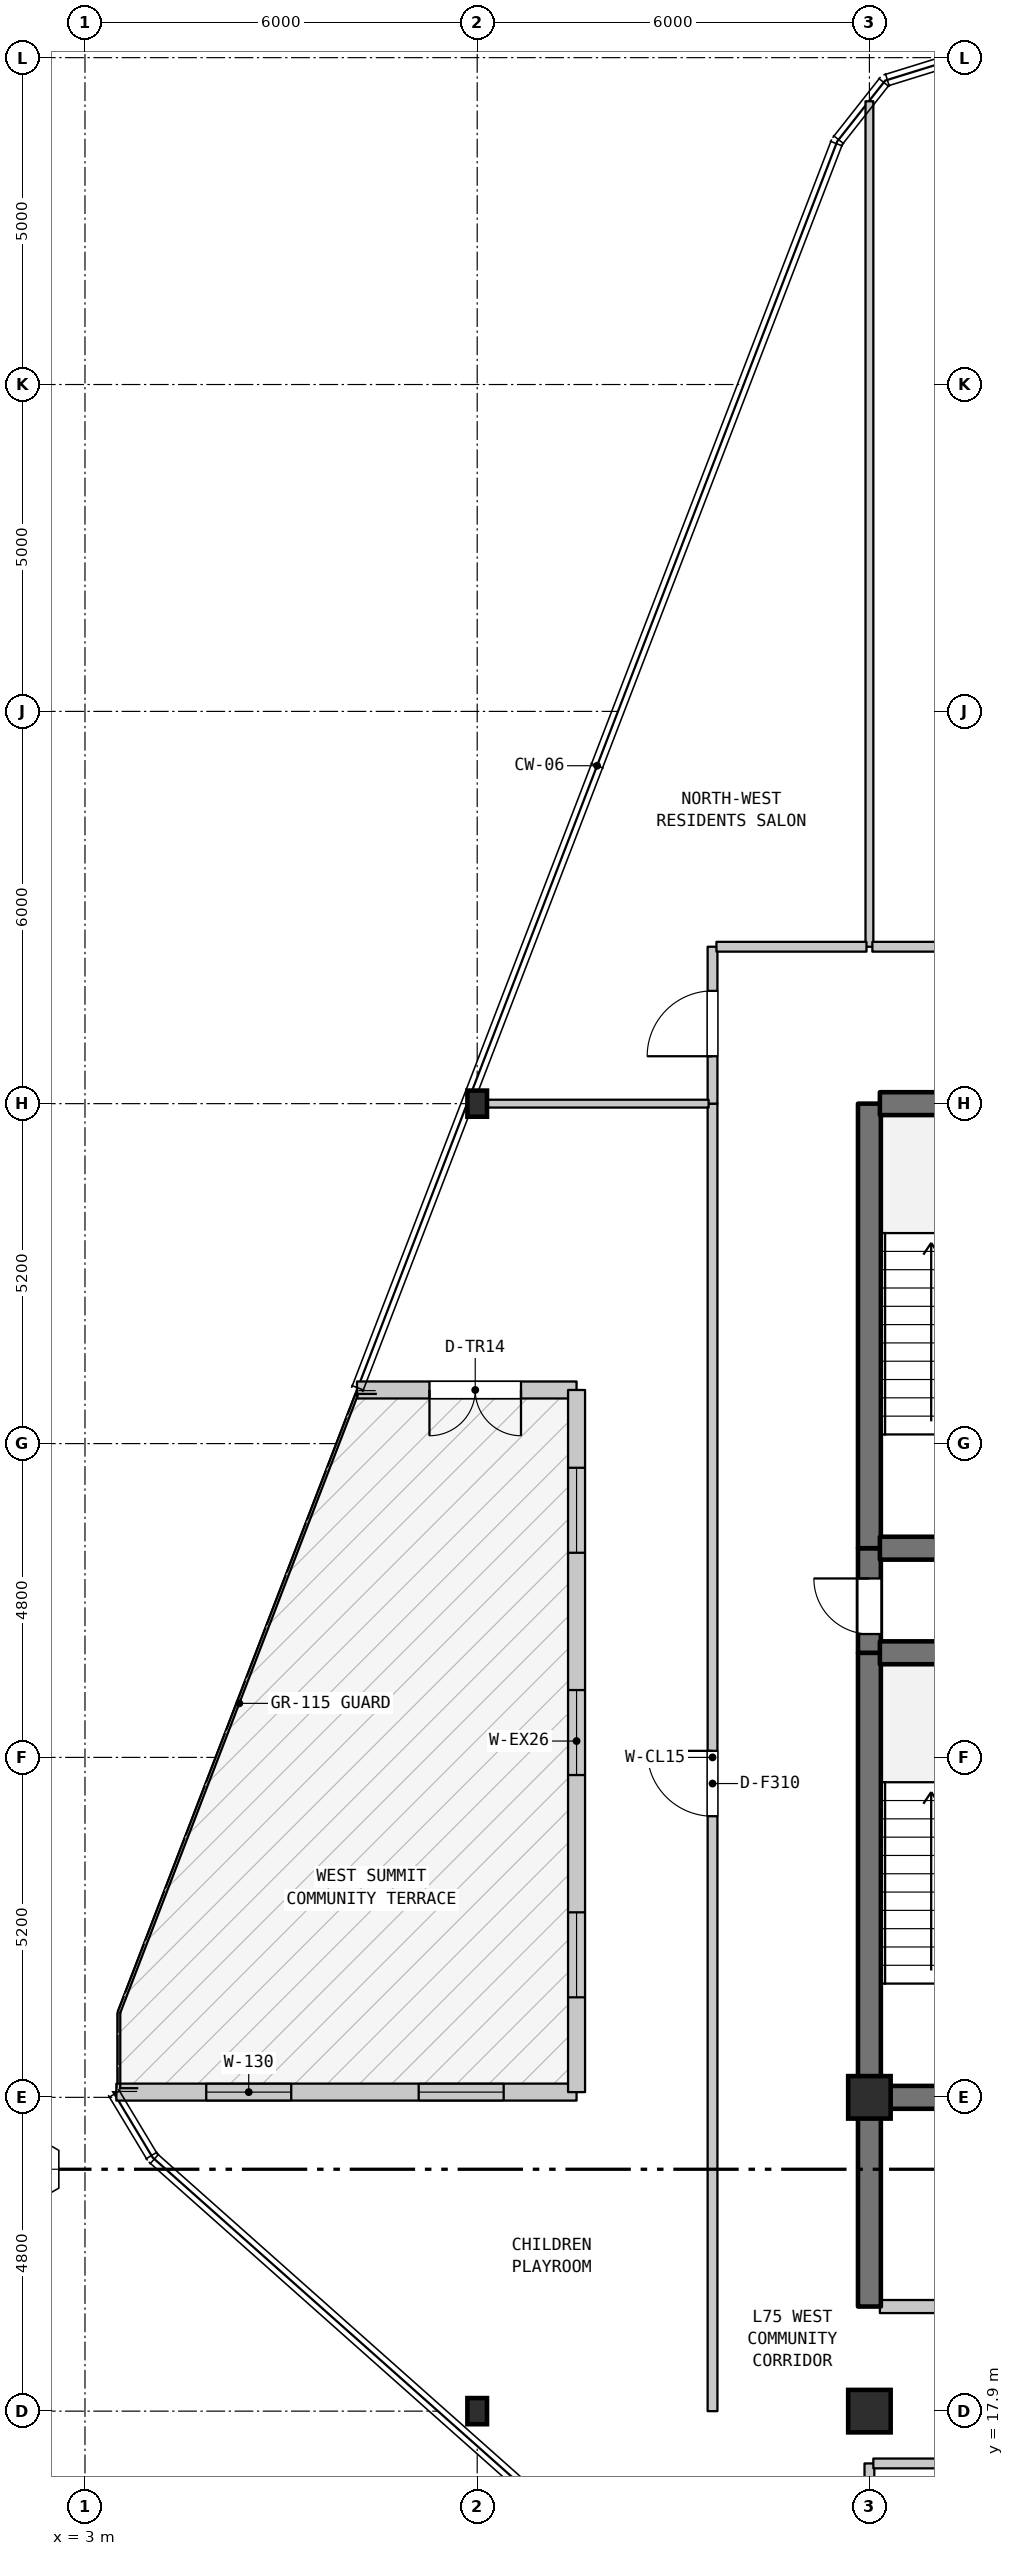
"""IFC4 building model, lengths in metres.
Left out: names, types, materials, properties, quantities, classifications, styles, units other than length and angle.
Written with IfcOpenShell. Run it as: python <this file> out.ifc"""

import sys

from ifc_helpers import new_model, si_unit, direction, frame, frame_2d, origin, origin_2d, place, context, subcontext, project, spatial, rectangle, i_section, extrude, element, fill, save


model = new_model("IFC4")
c1 = context("Model", 3, precision=1e-05, world=origin(), true_north=direction((0.0, 1.0)))
c2 = subcontext(c1, "Body", "Model", "MODEL_VIEW")
j1 = project(units=[si_unit("LENGTHUNIT", "METRE"), si_unit("PLANEANGLEUNIT", "RADIAN")], contexts=[c1])
p1 = place(None, origin())
s1 = spatial("IfcSite", under=j1, at=p1, CompositionType="ELEMENT")
p2 = place(p1, origin())
s2 = spatial("IfcBuilding", under=s1, at=p2, CompositionType="ELEMENT")
p3 = place(p2, frame((0.0, 0.0, 299.1)))
s3 = spatial("IfcBuildingStorey", under=s2, at=p3, CompositionType="ELEMENT", Elevation=299.1)
for number, where, z_axis, x_axis in (
    (1, (9.0, 17.9, 0.0), (0.0, 0.0, 1.0), (1.0, 0.0, 0.0)),
    (2, (9.0, 37.9, 0.0), (0.0, 0.0, 1.0), (1.0, 0.0, 0.0)),
):
    element("IfcColumn", number, at=place(p3, frame(where, z_axis=z_axis, x_axis=x_axis)), inside=s3, PredefinedType="COLUMN", context=c2, shape_type="SweptSolid", body=[
        extrude(i_section(OverallWidth=0.3, OverallDepth=0.4, WebThickness=0.013, FlangeThickness=0.024, FilletRadius=0.027, at=origin_2d()), origin(), (0.0, 0.0, 1.0), 4.5),
    ])
for number, where, z_axis, x_axis in (
    (3, (15.0, 17.9, 0.0), (0.0, 0.0, 1.0), (1.0, 0.0, 0.0)),
    (4, (15.0, 22.7, 0.0), (0.0, 0.0, 1.0), (1.0, 0.0, 0.0)),
):
    element("IfcColumn", number, at=place(p3, frame(where, z_axis=z_axis, x_axis=x_axis)), inside=s3, PredefinedType="COLUMN", context=c2, shape_type="SweptSolid", body=[
        extrude(rectangle(XDim=0.65, YDim=0.65, at=origin_2d()), origin(), (0.0, 0.0, 1.0), 4.5),
    ])
p4 = place(p3, frame((10.52, 33.52, 0.0), z_axis=(0.0, 0.0, 1.0), x_axis=(-1.0, 0.0, 0.0)))
e5 = element("IfcWall", 5, at=p4, inside=s3, PredefinedType="STANDARD", context=c2, shape_type="SweptSolid", body=[
    extrude(rectangle(XDim=3.359, YDim=0.26, at=frame_2d((1.68, 0.0))), origin(), (0.0, 0.0, 1.0), 4.19),
])
p5 = place(p4, frame((0.85, 0.0, 0.0)))
e6 = element("IfcOpeningElement", 6, at=p5, cuts=e5, PredefinedType="OPENING", context=c2, shape_type="SweptSolid", body=[
    extrude(rectangle(XDim=1.4, YDim=2.2, at=frame_2d((0.7, 1.1))), frame((0.0, 0.14, 0.0), z_axis=(0.0, -1.0, 0.0), x_axis=(1.0, 0.0, 0.0)), (0.0, 0.0, 1.0), 0.28),
])
p6 = place(p3, frame((3.48, 22.78, 0.0), z_axis=(0.0, 0.0, 1.0), x_axis=(1.0, 0.0, 0.0)))
e7 = element("IfcWall", 7, at=p6, inside=s3, PredefinedType="STANDARD", context=c2, shape_type="SweptSolid", body=[
    extrude(rectangle(XDim=7.04, YDim=0.26, at=frame_2d((3.52, 0.0))), origin(), (0.0, 0.0, 1.0), 4.19),
])
p7 = place(p6, frame((1.375, 0.0, 0.85)))
e8 = element("IfcOpeningElement", 8, at=p7, cuts=e7, PredefinedType="OPENING", context=c2, shape_type="SweptSolid", body=[
    extrude(rectangle(XDim=1.3, YDim=1.9, at=frame_2d((0.65, 0.95))), frame((0.0, 0.14, 0.0), z_axis=(0.0, -1.0, 0.0), x_axis=(1.0, 0.0, 0.0)), (0.0, 0.0, 1.0), 0.28),
])
p8 = place(p6, frame((4.625, 0.0, 0.85)))
e9 = element("IfcOpeningElement", 9, at=p8, cuts=e7, PredefinedType="OPENING", context=c2, shape_type="SweptSolid", body=[
    extrude(rectangle(XDim=1.3, YDim=1.9, at=frame_2d((0.65, 0.95))), frame((0.0, 0.14, 0.0), z_axis=(0.0, -1.0, 0.0), x_axis=(1.0, 0.0, 0.0)), (0.0, 0.0, 1.0), 0.28),
])
p9 = place(p3, frame((10.52, 22.78, 0.0), z_axis=(0.0, 0.0, 1.0), x_axis=(0.0, 1.0, 0.0)))
e10 = element("IfcWall", 10, at=p9, inside=s3, PredefinedType="STANDARD", context=c2, shape_type="SweptSolid", body=[
    extrude(rectangle(XDim=10.74, YDim=0.26, at=frame_2d((5.37, 0.0))), origin(), (0.0, 0.0, 1.0), 4.19),
])
p10 = place(p9, frame((1.45, 0.0, 0.85)))
e11 = element("IfcOpeningElement", 11, at=p10, cuts=e10, PredefinedType="OPENING", context=c2, shape_type="SweptSolid", body=[
    extrude(rectangle(XDim=1.3, YDim=1.9, at=frame_2d((0.65, 0.95))), frame((0.0, 0.14, 0.0), z_axis=(0.0, -1.0, 0.0), x_axis=(1.0, 0.0, 0.0)), (0.0, 0.0, 1.0), 0.28),
])
p11 = place(p9, frame((4.85, 0.0, 0.85)))
e12 = element("IfcOpeningElement", 12, at=p11, cuts=e10, PredefinedType="OPENING", context=c2, shape_type="SweptSolid", body=[
    extrude(rectangle(XDim=1.3, YDim=1.9, at=frame_2d((0.65, 0.95))), frame((0.0, 0.14, 0.0), z_axis=(0.0, -1.0, 0.0), x_axis=(1.0, 0.0, 0.0)), (0.0, 0.0, 1.0), 0.28),
])
p12 = place(p9, frame((8.25, 0.0, 0.85)))
e13 = element("IfcOpeningElement", 13, at=p12, cuts=e10, PredefinedType="OPENING", context=c2, shape_type="SweptSolid", body=[
    extrude(rectangle(XDim=1.3, YDim=1.9, at=frame_2d((0.65, 0.95))), frame((0.0, 0.14, 0.0), z_axis=(0.0, -1.0, 0.0), x_axis=(1.0, 0.0, 0.0)), (0.0, 0.0, 1.0), 0.28),
])
p13 = place(p3, frame((12.6, 17.9, 0.0), z_axis=(0.0, 0.0, 1.0), x_axis=(0.0, 1.0, 0.0)))
e14 = element("IfcWall", 14, at=p13, inside=s3, PredefinedType="STANDARD", context=c2, shape_type="SweptSolid", body=[
    extrude(rectangle(XDim=20.0, YDim=0.15, at=frame_2d((10.0, 0.0))), origin(), (0.0, 0.0, 1.0), 4.19),
])
p14 = place(p13, frame((9.1, 0.0, 0.0)))
e15 = element("IfcOpeningElement", 15, at=p14, cuts=e14, PredefinedType="OPENING", context=c2, shape_type="SweptSolid", body=[
    extrude(rectangle(XDim=1.0, YDim=2.15, at=frame_2d((0.5, 1.075))), frame((0.0, 0.085, 0.0), z_axis=(0.0, -1.0, 0.0), x_axis=(1.0, 0.0, 0.0)), (0.0, 0.0, 1.0), 0.17),
])
p15 = place(p3, frame((12.6, 37.9, 0.0), z_axis=(0.0, 0.0, 1.0), x_axis=(0.0, 1.0, 0.0)))
e16 = element("IfcWall", 16, at=p15, inside=s3, PredefinedType="STANDARD", context=c2, shape_type="SweptSolid", body=[
    extrude(rectangle(XDim=2.4, YDim=0.15, at=frame_2d((1.2, 0.0))), origin(), (0.0, 0.0, 1.0), 4.19),
])
p16 = place(p15, frame((0.725, 0.0, 0.0)))
e17 = element("IfcOpeningElement", 17, at=p16, cuts=e16, PredefinedType="OPENING", context=c2, shape_type="SweptSolid", body=[
    extrude(rectangle(XDim=1.0, YDim=2.15, at=frame_2d((0.5, 1.075))), frame((0.0, 0.085, 0.0), z_axis=(0.0, -1.0, 0.0), x_axis=(1.0, 0.0, 0.0)), (0.0, 0.0, 1.0), 0.17),
])
p17 = place(p3, frame((15.0, 13.0, 0.0), z_axis=(0.0, 0.0, 1.0), x_axis=(0.0, 1.0, 0.0)))
e18 = element("IfcWall", 18, at=p17, inside=s3, PredefinedType="STANDARD", context=c2, shape_type="SweptSolid", body=[
    extrude(rectangle(XDim=4.1, YDim=0.15, at=frame_2d((2.05, 0.0))), origin(), (0.0, 0.0, 1.0), 3.9),
])
p18 = place(p3, frame((15.0, 19.5, 0.0), z_axis=(0.0, 0.0, 1.0), x_axis=(0.0, 1.0, 0.0)))
e19 = element("IfcWall", 19, at=p18, inside=s3, PredefinedType="SHEAR", context=c2, shape_type="SweptSolid", body=[
    extrude(rectangle(XDim=3.2, YDim=0.35, at=frame_2d((1.6, 0.0))), origin(), (0.0, 0.0, 1.0), 4.19),
])
p19 = place(p3, frame((15.0, 22.7, 0.0), z_axis=(0.0, 0.0, 1.0), x_axis=(0.0, 1.0, 0.0)))
e20 = element("IfcWall", 20, at=p19, inside=s3, PredefinedType="SHEAR", context=c2, shape_type="SweptSolid", body=[
    extrude(rectangle(XDim=6.8, YDim=0.35, at=frame_2d((3.4, 0.0))), origin(), (0.0, 0.0, 1.0), 4.19),
])
p20 = place(p3, frame((15.0, 29.5, 0.0), z_axis=(0.0, 0.0, 1.0), x_axis=(0.0, 1.0, 0.0)))
e21 = element("IfcWall", 21, at=p20, inside=s3, PredefinedType="SHEAR", context=c2, shape_type="SweptSolid", body=[
    extrude(rectangle(XDim=1.6, YDim=0.35, at=frame_2d((0.8, 0.0))), origin(), (0.0, 0.0, 1.0), 4.19),
])
p21 = place(p20, frame((0.287, 0.0, 0.0)))
e22 = element("IfcOpeningElement", 22, at=p21, cuts=e21, PredefinedType="OPENING", context=c2, shape_type="SweptSolid", body=[
    extrude(rectangle(XDim=0.85, YDim=2.1, at=frame_2d((0.425, 1.05))), frame((0.0, 0.185, 0.0), z_axis=(0.0, -1.0, 0.0), x_axis=(1.0, 0.0, 0.0)), (0.0, 0.0, 1.0), 0.37),
])
p22 = place(p3, frame((15.0, 31.1, 0.0), z_axis=(0.0, 0.0, 1.0), x_axis=(0.0, 1.0, 0.0)))
e23 = element("IfcWall", 23, at=p22, inside=s3, PredefinedType="SHEAR", context=c2, shape_type="SweptSolid", body=[
    extrude(rectangle(XDim=6.8, YDim=0.35, at=frame_2d((3.4, 0.0))), origin(), (0.0, 0.0, 1.0), 4.19),
])
p23 = place(p3, frame((15.0, 40.3, 0.0), z_axis=(0.0, 0.0, 1.0), x_axis=(0.0, 1.0, 0.0)))
e24 = element("IfcWall", 24, at=p23, inside=s3, PredefinedType="PARTITIONING", context=c2, shape_type="SweptSolid", body=[
    extrude(rectangle(XDim=12.933, YDim=0.12, at=frame_2d((6.466, 0.0))), origin(), (0.0, 0.0, 1.0), 4.19),
])
p24 = place(p3, frame((15.06, 17.1, 0.0), z_axis=(0.0, 0.0, 1.0), x_axis=(1.0, 0.0, 0.0)))
e25 = element("IfcWall", 25, at=p24, inside=s3, PredefinedType="STANDARD", context=c2, shape_type="SweptSolid", body=[
    extrude(rectangle(XDim=8.295, YDim=0.15, at=frame_2d((4.147, 0.0))), origin(), (0.0, 0.0, 1.0), 4.19),
])
p25 = place(p24, frame((1.595, 0.0, 0.0)))
e26 = element("IfcOpeningElement", 26, at=p25, cuts=e25, PredefinedType="OPENING", context=c2, shape_type="SweptSolid", body=[
    extrude(rectangle(XDim=0.9, YDim=2.1, at=frame_2d((0.45, 1.05))), frame((0.0, 0.085, 0.0), z_axis=(0.0, -1.0, 0.0), x_axis=(1.0, 0.0, 0.0)), (0.0, 0.0, 1.0), 0.17),
])
p26 = place(p24, frame((5.645, 0.0, 0.0)))
e27 = element("IfcOpeningElement", 27, at=p26, cuts=e25, PredefinedType="OPENING", context=c2, shape_type="SweptSolid", body=[
    extrude(rectangle(XDim=0.9, YDim=2.1, at=frame_2d((0.45, 1.05))), frame((0.0, 0.085, 0.0), z_axis=(0.0, -1.0, 0.0), x_axis=(1.0, 0.0, 0.0)), (0.0, 0.0, 1.0), 0.17),
])
p27 = place(p3, frame((15.16, 19.5, 0.0), z_axis=(0.0, 0.0, 1.0), x_axis=(1.0, 0.0, 0.0)))
e28 = element("IfcWall", 28, at=p27, inside=s3, PredefinedType="STANDARD", context=c2, shape_type="SweptSolid", body=[
    extrude(rectangle(XDim=3.68, YDim=0.2, at=frame_2d((1.84, 0.0))), origin(), (0.0, 0.0, 1.0), 4.19),
])
p28 = place(p27, frame((1.39, 0.0, 0.0)))
e29 = element("IfcOpeningElement", 29, at=p28, cuts=e28, PredefinedType="OPENING", context=c2, shape_type="SweptSolid", body=[
    extrude(rectangle(XDim=0.9, YDim=2.15, at=frame_2d((0.45, 1.075))), frame((0.0, 0.11, 0.0), z_axis=(0.0, -1.0, 0.0), x_axis=(1.0, 0.0, 0.0)), (0.0, 0.0, 1.0), 0.22),
])
for number, where, z_axis, x_axis in (
    (30, (15.16, 22.7, 0.0), (0.0, 0.0, 1.0), (1.0, 0.0, 0.0)),
    (31, (15.16, 29.5, 0.0), (0.0, 0.0, 1.0), (1.0, 0.0, 0.0)),
    (32, (15.16, 31.1, 0.0), (0.0, 0.0, 1.0), (1.0, 0.0, 0.0)),
):
    element("IfcWall", number, at=place(p3, frame(where, z_axis=z_axis, x_axis=x_axis)), inside=s3, PredefinedType="SHEAR", context=c2, shape_type="SweptSolid", body=[
        extrude(rectangle(XDim=3.68, YDim=0.35, at=frame_2d((1.84, 0.0))), origin(), (0.0, 0.0, 1.0), 4.19),
    ])
p29 = place(p3, frame((8.856, 37.9, 0.0), z_axis=(0.0, 0.0, 1.0), x_axis=(1.0, 0.0, 0.0)))
e33 = element("IfcWall", 33, at=p29, inside=s3, PredefinedType="PARTITIONING", context=c2, shape_type="SweptSolid", body=[
    extrude(rectangle(XDim=3.684, YDim=0.12, at=frame_2d((1.842, 0.0))), origin(), (0.0, 0.0, 1.0), 3.84),
])
p30 = place(p3, frame((15.16, 37.9, 0.0), z_axis=(0.0, 0.0, 1.0), x_axis=(1.0, 0.0, 0.0)))
e34 = element("IfcWall", 34, at=p30, inside=s3, PredefinedType="SHEAR", context=c2, shape_type="SweptSolid", body=[
    extrude(rectangle(XDim=3.68, YDim=0.35, at=frame_2d((1.84, 0.0))), origin(), (0.0, 0.0, 1.0), 4.19),
])
p31 = place(p3, frame((12.66, 40.3, 0.0), z_axis=(0.0, 0.0, 1.0), x_axis=(1.0, 0.0, 0.0)))
e35 = element("IfcWall", 35, at=p31, inside=s3, PredefinedType="STANDARD", context=c2, shape_type="SweptSolid", body=[
    extrude(rectangle(XDim=2.295, YDim=0.15, at=frame_2d((1.147, 0.0))), origin(), (0.0, 0.0, 1.0), 4.19),
])
p32 = place(p3, frame((15.045, 40.3, 0.0), z_axis=(0.0, 0.0, 1.0), x_axis=(1.0, 0.0, 0.0)))
e36 = element("IfcWall", 36, at=p32, inside=s3, PredefinedType="STANDARD", context=c2, shape_type="SweptSolid", body=[
    extrude(rectangle(XDim=17.895, YDim=0.15, at=frame_2d((8.948, 0.0))), origin(), (0.0, 0.0, 1.0), 4.19),
])
p33 = place(p32, frame((9.205, 0.0, 0.0)))
e37 = element("IfcOpeningElement", 37, at=p33, cuts=e36, PredefinedType="OPENING", context=c2, shape_type="SweptSolid", body=[
    extrude(rectangle(XDim=1.0, YDim=2.15, at=frame_2d((0.5, 1.075))), frame((0.0, 0.085, 0.0), z_axis=(0.0, -1.0, 0.0), x_axis=(1.0, 0.0, 0.0)), (0.0, 0.0, 1.0), 0.17),
])
p34 = place(p5, origin())
e38 = element("IfcDoor", 38, at=p34, inside=s3, OperationType="DOUBLE_DOOR_SINGLE_SWING", PredefinedType="DOOR", context=c2, shape_type="SweptSolid", body=[
    extrude(rectangle(XDim=1.4, YDim=2.2, at=frame_2d((0.7, 1.1))), frame((0.0, 0.025, 0.0), z_axis=(0.0, -1.0, 0.0), x_axis=(1.0, 0.0, 0.0)), (0.0, 0.0, 1.0), 0.05),
])
fill(e6, e38)
p35 = place(p7, origin())
e39 = element("IfcWindow", 39, at=p35, inside=s3, PartitioningType="SINGLE_PANEL", PredefinedType="WINDOW", context=c2, shape_type="SweptSolid", body=[
    extrude(rectangle(XDim=1.3, YDim=1.9, at=frame_2d((0.65, 0.95))), frame((0.0, 0.03, 0.0), z_axis=(0.0, -1.0, 0.0), x_axis=(1.0, 0.0, 0.0)), (0.0, 0.0, 1.0), 0.06),
])
fill(e8, e39)
p36 = place(p8, origin())
e40 = element("IfcWindow", 40, at=p36, inside=s3, PartitioningType="SINGLE_PANEL", PredefinedType="WINDOW", context=c2, shape_type="SweptSolid", body=[
    extrude(rectangle(XDim=1.3, YDim=1.9, at=frame_2d((0.65, 0.95))), frame((0.0, 0.03, 0.0), z_axis=(0.0, -1.0, 0.0), x_axis=(1.0, 0.0, 0.0)), (0.0, 0.0, 1.0), 0.06),
])
fill(e9, e40)
p37 = place(p10, origin())
e41 = element("IfcWindow", 41, at=p37, inside=s3, PartitioningType="SINGLE_PANEL", PredefinedType="WINDOW", context=c2, shape_type="SweptSolid", body=[
    extrude(rectangle(XDim=1.3, YDim=1.9, at=frame_2d((0.65, 0.95))), frame((0.0, 0.03, 0.0), z_axis=(0.0, -1.0, 0.0), x_axis=(1.0, 0.0, 0.0)), (0.0, 0.0, 1.0), 0.06),
])
fill(e11, e41)
p38 = place(p11, origin())
e42 = element("IfcWindow", 42, at=p38, inside=s3, PartitioningType="SINGLE_PANEL", PredefinedType="WINDOW", context=c2, shape_type="SweptSolid", body=[
    extrude(rectangle(XDim=1.3, YDim=1.9, at=frame_2d((0.65, 0.95))), frame((0.0, 0.03, 0.0), z_axis=(0.0, -1.0, 0.0), x_axis=(1.0, 0.0, 0.0)), (0.0, 0.0, 1.0), 0.06),
])
fill(e12, e42)
p39 = place(p12, origin())
e43 = element("IfcWindow", 43, at=p39, inside=s3, PartitioningType="SINGLE_PANEL", PredefinedType="WINDOW", context=c2, shape_type="SweptSolid", body=[
    extrude(rectangle(XDim=1.3, YDim=1.9, at=frame_2d((0.65, 0.95))), frame((0.0, 0.03, 0.0), z_axis=(0.0, -1.0, 0.0), x_axis=(1.0, 0.0, 0.0)), (0.0, 0.0, 1.0), 0.06),
])
fill(e13, e43)
p40 = place(p14, origin())
e44 = element("IfcDoor", 44, at=p40, inside=s3, OperationType="SINGLE_SWING_RIGHT", PredefinedType="DOOR", context=c2, shape_type="SweptSolid", body=[
    extrude(rectangle(XDim=1.0, YDim=2.15, at=frame_2d((0.5, 1.075))), frame((0.0, 0.025, 0.0), z_axis=(0.0, -1.0, 0.0), x_axis=(1.0, 0.0, 0.0)), (0.0, 0.0, 1.0), 0.05),
])
fill(e15, e44)
p41 = place(p16, origin())
e45 = element("IfcDoor", 45, at=p41, inside=s3, OperationType="SINGLE_SWING_LEFT", PredefinedType="DOOR", context=c2, shape_type="SweptSolid", body=[
    extrude(rectangle(XDim=1.0, YDim=2.15, at=frame_2d((0.5, 1.075))), frame((0.0, 0.025, 0.0), z_axis=(0.0, -1.0, 0.0), x_axis=(1.0, 0.0, 0.0)), (0.0, 0.0, 1.0), 0.05),
])
fill(e17, e45)
p42 = place(p21, origin())
e46 = element("IfcDoor", 46, at=p42, inside=s3, OperationType="SINGLE_SWING_RIGHT", PredefinedType="DOOR", context=c2, shape_type="SweptSolid", body=[
    extrude(rectangle(XDim=0.85, YDim=2.1, at=frame_2d((0.425, 1.05))), frame((0.0, 0.025, 0.0), z_axis=(0.0, -1.0, 0.0), x_axis=(1.0, 0.0, 0.0)), (0.0, 0.0, 1.0), 0.05),
])
fill(e22, e46)
save(model, sys.argv[1])
